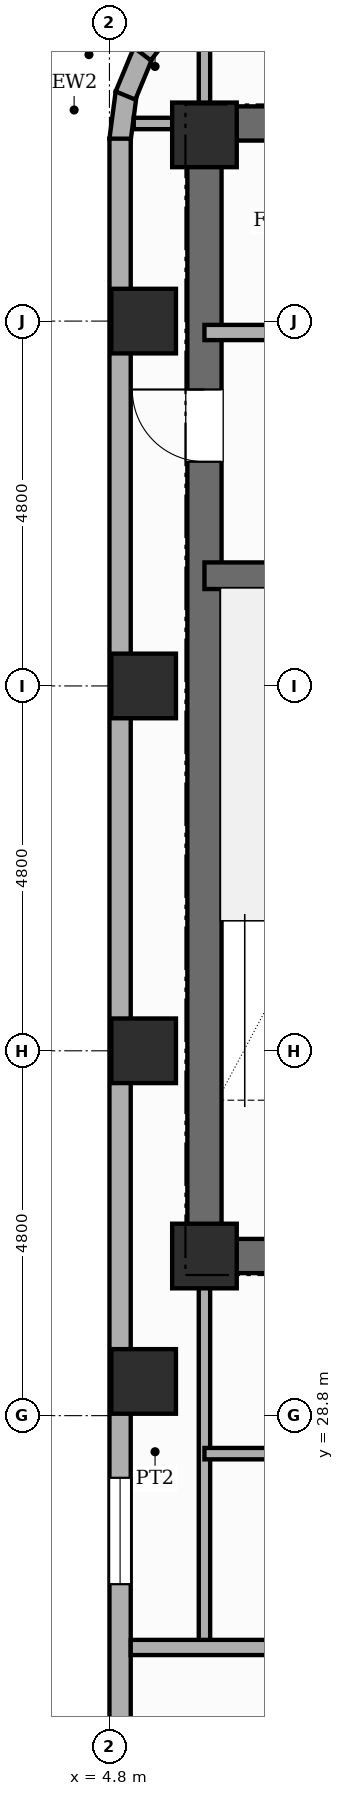
"""IFC4 building model, lengths in metres.
Left out: names, types, materials, properties, quantities, classifications, styles, units other than length and angle.
Written with IfcOpenShell. Run it as: python <this file> out.ifc"""

import sys

from ifc_helpers import new_model, si_unit, direction, frame, frame_2d, origin, origin_2d, place, context, subcontext, project, spatial, rectangle, extrude, element, fill, save


model = new_model("IFC4")
c1 = context("Model", 3, precision=1e-05, world=origin(), true_north=direction((0.0, 1.0)))
c2 = subcontext(c1, "Body", "Model", "MODEL_VIEW")
j1 = project(units=[si_unit("LENGTHUNIT", "METRE"), si_unit("PLANEANGLEUNIT", "RADIAN")], contexts=[c1])
p1 = place(None, origin())
s1 = spatial("IfcSite", under=j1, at=p1, CompositionType="ELEMENT")
p2 = place(p1, origin())
s2 = spatial("IfcBuilding", under=s1, at=p2, CompositionType="ELEMENT")
p3 = place(p2, frame((0.0, 0.0, 207.4)))
s3 = spatial("IfcBuildingStorey", under=s2, at=p3, CompositionType="ELEMENT", Elevation=207.4)
p4 = place(p3, frame((6.05, 30.675, 0.0), z_axis=(0.0, 0.0, 1.0), x_axis=(0.0, 1.0, 0.0)))
e1 = element("IfcWall", 1, at=p4, inside=s3, PredefinedType="SHEAR", context=c2, shape_type="SweptSolid", body=[
    extrude(rectangle(XDim=15.35, YDim=0.45, at=frame_2d((7.675, 0.0))), origin(), (0.0, 0.0, 1.0), 3.6),
])
p5 = place(p4, frame((10.675, 0.0, 0.0)))
e2 = element("IfcOpeningElement", 2, at=p5, cuts=e1, PredefinedType="OPENING", context=c2, shape_type="SweptSolid", body=[
    extrude(rectangle(XDim=0.95, YDim=2.15, at=frame_2d((0.475, 1.075))), frame((0.0, 0.235, 0.0), z_axis=(0.0, -1.0, 0.0), x_axis=(1.0, 0.0, 0.0)), (0.0, 0.0, 1.0), 0.47),
])
p6 = place(p3, frame((6.05, 45.8, 0.0), z_axis=(0.0, 0.0, 1.0), x_axis=(1.0, 0.0, 0.0)))
e3 = element("IfcWall", 3, at=p6, inside=s3, PredefinedType="SHEAR", context=c2, shape_type="SweptSolid", body=[
    extrude(rectangle(XDim=16.7, YDim=0.45, at=frame_2d((8.35, 0.0))), origin(), (0.0, 0.0, 1.0), 3.6),
])
p7 = place(p3, frame((6.05, 30.9, 0.0), z_axis=(0.0, 0.0, 1.0), x_axis=(1.0, 0.0, 0.0)))
e4 = element("IfcWall", 4, at=p7, inside=s3, PredefinedType="SHEAR", context=c2, shape_type="SweptSolid", body=[
    extrude(rectangle(XDim=3.91, YDim=0.45, at=frame_2d((1.955, 0.0))), origin(), (0.0, 0.0, 1.0), 3.6),
])
p8 = place(p3, frame((6.05, 39.85, 0.0), z_axis=(0.0, 0.0, 1.0), x_axis=(1.0, 0.0, 0.0)))
e5 = element("IfcWall", 5, at=p8, inside=s3, PredefinedType="SHEAR", context=c2, shape_type="SweptSolid", body=[
    extrude(rectangle(XDim=3.91, YDim=0.35, at=frame_2d((1.955, 0.0))), origin(), (0.0, 0.0, 1.0), 3.6),
])
for number, where, z_axis, x_axis in (
    (6, (5.25, 29.25, 0.0), (0.0, 0.0, 1.0), (1.0, 0.0, 0.0)),
    (7, (5.25, 33.6, 0.0), (0.0, 0.0, 1.0), (1.0, 0.0, 0.0)),
    (8, (5.25, 38.4, 0.0), (0.0, 0.0, 1.0), (1.0, 0.0, 0.0)),
    (9, (5.25, 43.2, 0.0), (0.0, 0.0, 1.0), (1.0, 0.0, 0.0)),
    (10, (6.05, 30.9, 0.0), (0.0, 0.0, 1.0), (1.0, 0.0, 0.0)),
    (11, (6.05, 45.65, 0.0), (0.0, 0.0, 1.0), (1.0, 0.0, 0.0)),
):
    element("IfcColumn", number, at=place(p3, frame(where, z_axis=z_axis, x_axis=x_axis)), inside=s3, PredefinedType="COLUMN", context=c2, shape_type="SweptSolid", body=[
        extrude(rectangle(XDim=0.85, YDim=0.85, at=origin_2d()), origin(), (0.0, 0.0, 1.0), 3.6),
    ])
for number, where, z_axis, x_axis in (
    (12, (4.939, 45.582, 0.0), (0.0, 0.0, 1.0), (0.131, 0.991, 0.0)),
    (13, (5.011, 46.167, 0.0), (0.0, 0.0, 1.0), (0.383, 0.924, 0.0)),
    (14, (5.233, 46.715, 0.0), (0.0, 0.0, 1.0), (0.609, 0.793, 0.0)),
):
    element("IfcWall", number, at=place(p3, frame(where, z_axis=z_axis, x_axis=x_axis)), inside=s3, PredefinedType="STANDARD", context=c2, shape_type="SweptSolid", body=[
        extrude(rectangle(XDim=0.626, YDim=0.28, at=frame_2d((0.313, 0.0))), origin(), (0.0, 0.0, 1.0), 3.38),
    ])
p9 = place(p3, frame((4.94, 12.0, 0.0), z_axis=(0.0, 0.0, 1.0), x_axis=(0.0, 1.0, 0.0)))
e15 = element("IfcWall", 15, at=p9, inside=s3, PredefinedType="STANDARD", context=c2, shape_type="SweptSolid", body=[
    extrude(rectangle(XDim=33.6, YDim=0.28, at=frame_2d((16.8, 0.0))), origin(), (0.0, 0.0, 1.0), 2.66),
])
p10 = place(p9, frame((9.05, 0.0, 0.0)))
e16 = element("IfcOpeningElement", 16, at=p10, cuts=e15, PredefinedType="OPENING", context=c2, shape_type="SweptSolid", body=[
    extrude(rectangle(XDim=1.1, YDim=2.15, at=frame_2d((0.55, 1.075))), frame((0.0, 0.15, 0.0), z_axis=(0.0, -1.0, 0.0), x_axis=(1.0, 0.0, 0.0)), (0.0, 0.0, 1.0), 0.3),
])
p11 = place(p9, frame((14.583, 0.0, 0.65)))
e17 = element("IfcOpeningElement", 17, at=p11, cuts=e15, PredefinedType="OPENING", context=c2, shape_type="SweptSolid", body=[
    extrude(rectangle(XDim=1.4, YDim=1.1, at=frame_2d((0.7, 0.55))), frame((0.0, 0.15, 0.0), z_axis=(0.0, -1.0, 0.0), x_axis=(1.0, 0.0, 0.0)), (0.0, 0.0, 1.0), 0.3),
])
p12 = place(p9, frame((0.308, 0.0, 0.65)))
e18 = element("IfcOpeningElement", 18, at=p12, cuts=e15, PredefinedType="OPENING", context=c2, shape_type="SweptSolid", body=[
    extrude(rectangle(XDim=1.4, YDim=1.1, at=frame_2d((0.7, 0.55))), frame((0.0, 0.15, 0.0), z_axis=(0.0, -1.0, 0.0), x_axis=(1.0, 0.0, 0.0)), (0.0, 0.0, 1.0), 0.3),
])
p13 = place(p9, frame((7.923, 0.0, 0.45)))
e19 = element("IfcOpeningElement", 19, at=p13, cuts=e15, PredefinedType="OPENING", context=c2, shape_type="SweptSolid", body=[
    extrude(rectangle(XDim=0.75, YDim=1.8, at=frame_2d((0.375, 0.9))), frame((0.0, 0.15, 0.0), z_axis=(0.0, -1.0, 0.0), x_axis=(1.0, 0.0, 0.0)), (0.0, 0.0, 1.0), 0.3),
])
p14 = place(p3, frame((6.05, 43.05, 0.0), z_axis=(0.0, 0.0, 1.0), x_axis=(1.0, 0.0, 0.0)))
e20 = element("IfcWall", 20, at=p14, inside=s3, PredefinedType="POLYGONAL", context=c2, shape_type="SweptSolid", body=[
    extrude(rectangle(XDim=3.91, YDim=0.2, at=frame_2d((1.955, 0.0))), origin(), (0.0, 0.0, 1.0), 2.66),
])
p15 = place(p14, frame((1.35, 0.0, 0.0)))
e21 = element("IfcOpeningElement", 21, at=p15, cuts=e20, PredefinedType="OPENING", context=c2, shape_type="SweptSolid", body=[
    extrude(rectangle(XDim=0.88, YDim=2.1, at=frame_2d((0.44, 1.05))), frame((0.0, 0.11, 0.0), z_axis=(0.0, -1.0, 0.0), x_axis=(1.0, 0.0, 0.0)), (0.0, 0.0, 1.0), 0.22),
])
p16 = place(p3, frame((6.05, 25.75, 0.0), z_axis=(0.0, 0.0, 1.0), x_axis=(0.0, 1.0, 0.0)))
e22 = element("IfcWall", 22, at=p16, inside=s3, PredefinedType="PARTITIONING", context=c2, shape_type="SweptSolid", body=[
    extrude(rectangle(XDim=5.15, YDim=0.15, at=frame_2d((2.575, 0.0))), origin(), (0.0, 0.0, 1.0), 3.38),
])
p17 = place(p3, frame((6.05, 28.3, 0.0), z_axis=(0.0, 0.0, 1.0), x_axis=(1.0, 0.0, 0.0)))
e23 = element("IfcWall", 23, at=p17, inside=s3, PredefinedType="PARTITIONING", context=c2, shape_type="SweptSolid", body=[
    extrude(rectangle(XDim=7.55, YDim=0.15, at=frame_2d((3.775, 0.0))), origin(), (0.0, 0.0, 1.0), 3.38),
])
p18 = place(p3, frame((5.08, 25.75, 0.0), z_axis=(0.0, 0.0, 1.0), x_axis=(1.0, 0.0, 0.0)))
e24 = element("IfcWall", 24, at=p18, inside=s3, PredefinedType="PARTITIONING", context=c2, shape_type="SweptSolid", body=[
    extrude(rectangle(XDim=8.52, YDim=0.2, at=frame_2d((4.26, 0.0))), origin(), (0.0, 0.0, 1.0), 3.38),
])
p19 = place(p3, frame((5.12, 45.8, 0.0), z_axis=(0.0, 0.0, 1.0), x_axis=(1.0, 0.0, 0.0)))
e25 = element("IfcWall", 25, at=p19, inside=s3, PredefinedType="PARTITIONING", context=c2, shape_type="SweptSolid", body=[
    extrude(rectangle(XDim=0.93, YDim=0.15, at=frame_2d((0.465, 0.0))), origin(), (0.0, 0.0, 1.0), 3.38),
])
p20 = place(p3, frame((6.05, 45.8, 0.0), z_axis=(0.0, 0.0, 1.0), x_axis=(0.0, 1.0, 0.0)))
e26 = element("IfcWall", 26, at=p20, inside=s3, PredefinedType="PARTITIONING", context=c2, shape_type="SweptSolid", body=[
    extrude(rectangle(XDim=1.5, YDim=0.15, at=frame_2d((0.75, 0.0))), origin(), (0.0, 0.0, 1.0), 3.38),
])
p21 = place(p11, origin())
e27 = element("IfcWindow", 27, at=p21, inside=s3, PartitioningType="SINGLE_PANEL", PredefinedType="WINDOW", context=c2, shape_type="SweptSolid", body=[
    extrude(rectangle(XDim=1.4, YDim=1.1, at=frame_2d((0.7, 0.55))), frame((0.0, 0.03, 0.0), z_axis=(0.0, -1.0, 0.0), x_axis=(1.0, 0.0, 0.0)), (0.0, 0.0, 1.0), 0.06),
])
fill(e17, e27)
p22 = place(p5, origin())
e28 = element("IfcDoor", 28, at=p22, inside=s3, OperationType="SINGLE_SWING_RIGHT", PredefinedType="DOOR", context=c2, shape_type="SweptSolid", body=[
    extrude(rectangle(XDim=0.95, YDim=2.15, at=frame_2d((0.475, 1.075))), frame((0.0, 0.025, 0.0), z_axis=(0.0, -1.0, 0.0), x_axis=(1.0, 0.0, 0.0)), (0.0, 0.0, 1.0), 0.05),
])
fill(e2, e28)
save(model, sys.argv[1])
